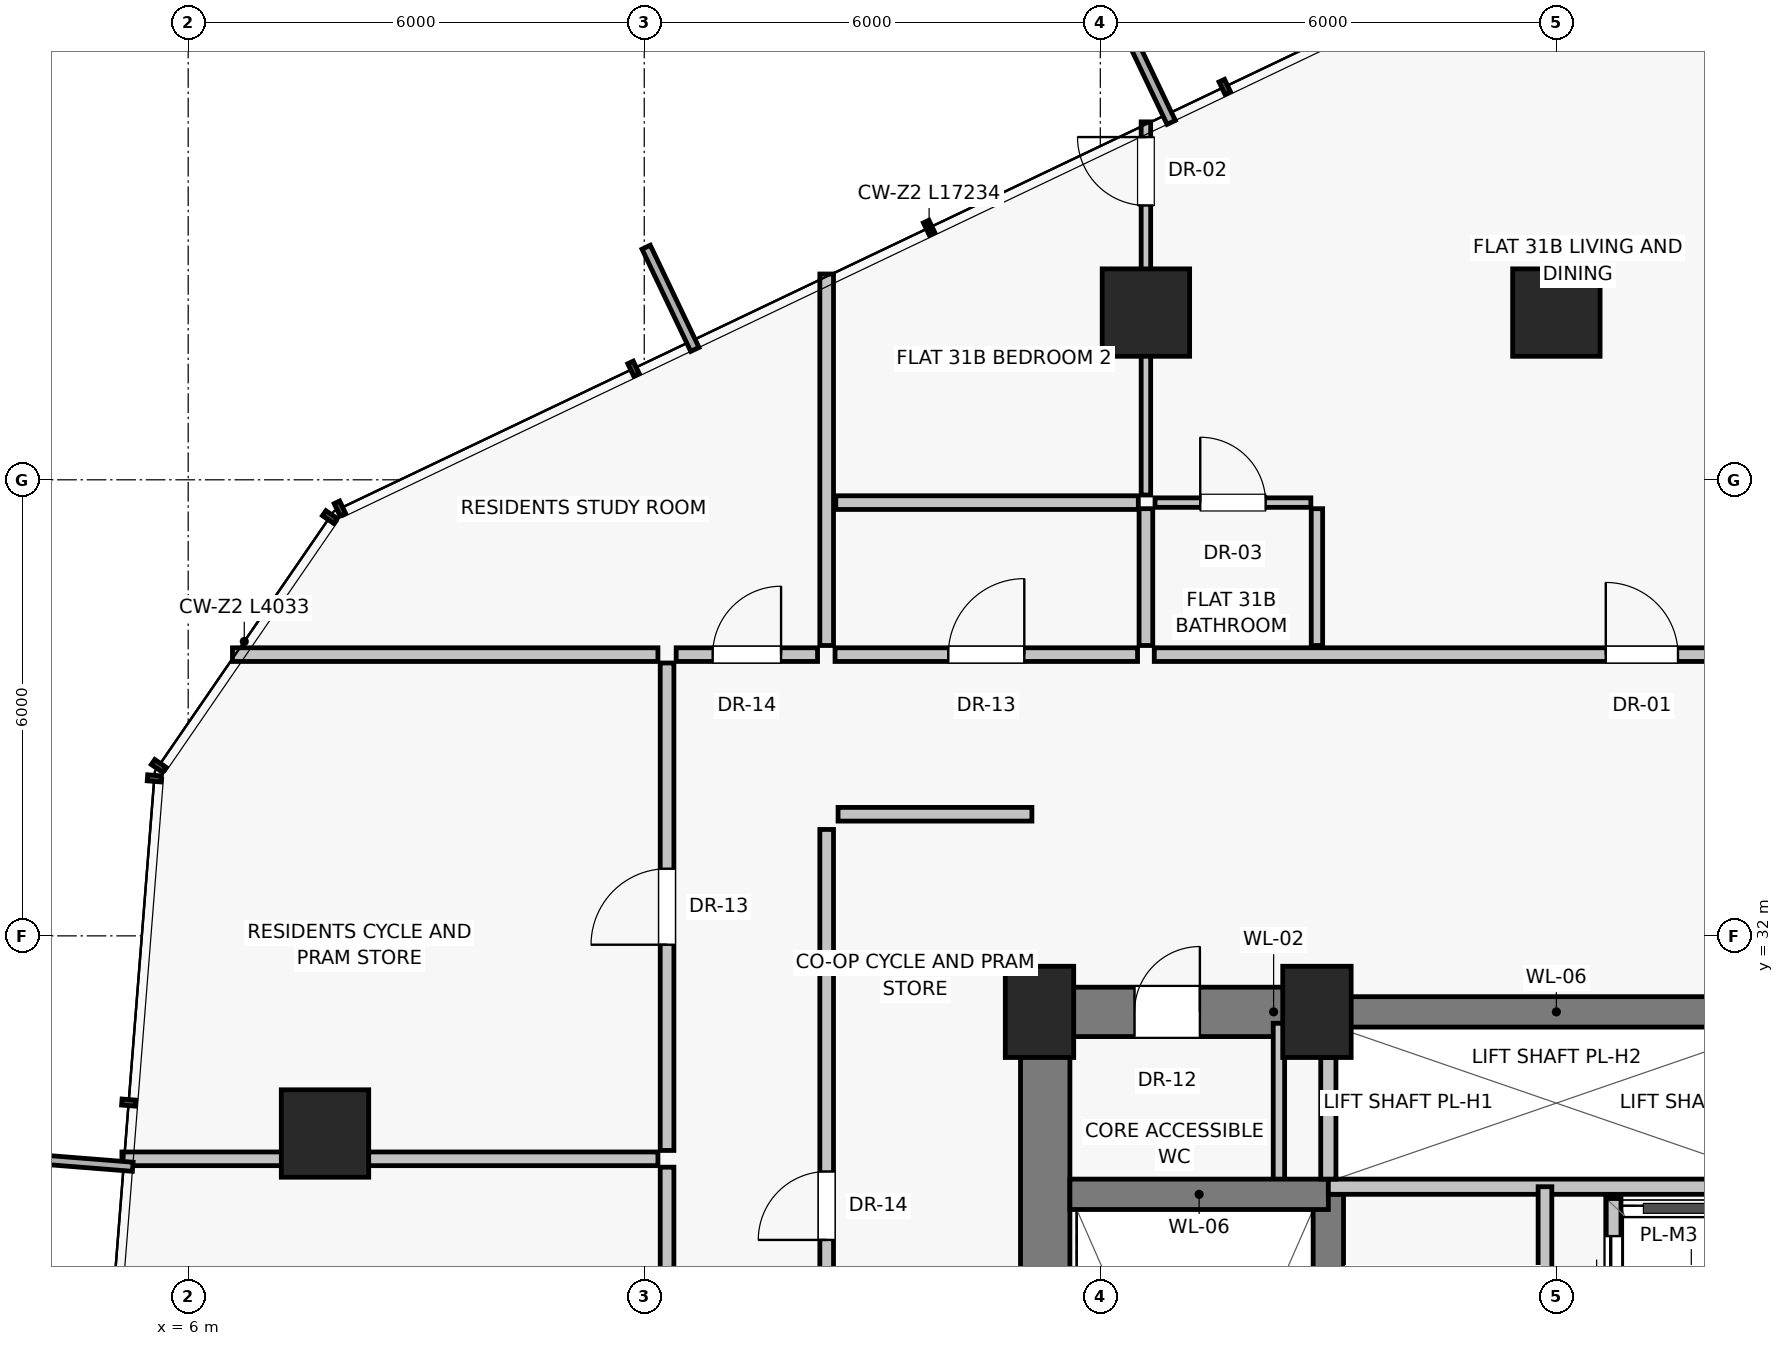
"""IFC4 building model, lengths in metres.
Left out: names, types, materials, properties, quantities, classifications, styles, units other than length and angle.
Written with IfcOpenShell. Run it as: python <this file> out.ifc"""

import sys

from ifc_helpers import new_model, si_unit, direction, frame, frame_2d, origin, origin_2d, place, context, subcontext, project, spatial, rectangle, extrude, source, transform, mapped, element, fill, save


model = new_model("IFC4")
c1 = context("Model", 3, precision=1e-05, world=origin(), true_north=direction((0.0, 1.0)))
c2 = subcontext(c1, "Body", "Model", "MODEL_VIEW")
j1 = project(units=[si_unit("LENGTHUNIT", "METRE"), si_unit("PLANEANGLEUNIT", "RADIAN")], contexts=[c1])
p1 = place(None, origin())
s1 = spatial("IfcSite", under=j1, at=p1, CompositionType="ELEMENT")
p2 = place(p1, origin())
s2 = spatial("IfcBuilding", under=s1, at=p2, CompositionType="ELEMENT")
p3 = place(p2, frame((0.0, 0.0, 113.25)))
s3 = spatial("IfcBuildingStorey", under=s2, at=p3, CompositionType="ELEMENT", Elevation=113.25)
for number, where, z_axis, x_axis in (
    (1, (17.2, 31.0, 0.0), (0.0, 0.0, 1.0), (1.0, 0.0, 0.0)),
    (2, (20.85, 31.0, 0.0), (0.0, 0.0, 1.0), (1.0, 0.0, 0.0)),
):
    element("IfcColumn", number, at=place(p3, frame(where, z_axis=z_axis, x_axis=x_axis)), inside=s3, PredefinedType="PILASTER", context=c2, shape_type="SweptSolid", body=[
        extrude(rectangle(XDim=0.9, YDim=1.2, at=origin_2d()), origin(), (0.0, 0.0, 1.0), 3.25),
    ])
for number, where, z_axis, x_axis in (
    (3, (24.0, 40.2, 0.0), (0.0, 0.0, 1.0), (1.0, 0.0, 0.0)),
    (4, (18.6, 40.2, 0.0), (0.0, 0.0, 1.0), (1.0, 0.0, 0.0)),
    (5, (7.8, 29.4, 0.0), (0.0, 0.0, 1.0), (1.0, 0.0, 0.0)),
):
    element("IfcColumn", number, at=place(p3, frame(where, z_axis=z_axis, x_axis=x_axis)), inside=s3, PredefinedType="COLUMN", context=c2, shape_type="SweptSolid", body=[
        extrude(rectangle(XDim=1.15, YDim=1.15, at=origin_2d()), origin(), (0.0, 0.0, 1.0), 3.25),
    ])
p4 = place(p3, frame((17.275, 16.8, 0.0), z_axis=(0.0, 0.0, 1.0), x_axis=(0.0, 1.0, 0.0)))
e6 = element("IfcWall", 6, at=p4, inside=s3, PredefinedType="SHEAR", context=c2, shape_type="SweptSolid", body=[
    extrude(rectangle(XDim=14.2, YDim=0.65, at=frame_2d((7.1, 0.0))), origin(), (0.0, 0.0, 1.0), 3.0),
])
p5 = place(p3, frame((17.2, 31.0, 0.0), z_axis=(0.0, 0.0, 1.0), x_axis=(1.0, 0.0, 0.0)))
e7 = element("IfcWall", 7, at=p5, inside=s3, PredefinedType="SHEAR", context=c2, shape_type="SweptSolid", body=[
    extrude(rectangle(XDim=3.8, YDim=0.65, at=frame_2d((1.9, 0.0))), origin(), (0.0, 0.0, 1.0), 3.0),
])
p6 = place(p5, frame((1.25, 0.0, 0.0)))
e8 = element("IfcOpeningElement", 8, at=p6, cuts=e7, PredefinedType="OPENING", context=c2, shape_type="SweptSolid", body=[
    extrude(rectangle(XDim=0.86, YDim=2.01, at=frame_2d((0.43, 1.005))), frame((0.0, 0.335, 0.0), z_axis=(0.0, -1.0, 0.0), x_axis=(1.0, 0.0, 0.0)), (0.0, 0.0, 1.0), 0.67),
])
p7 = place(p3, frame((21.0, 31.0, 0.0), z_axis=(0.0, 0.0, 1.0), x_axis=(1.0, 0.0, 0.0)))
e9 = element("IfcWall", 9, at=p7, inside=s3, PredefinedType="SHEAR", context=c2, shape_type="SweptSolid", body=[
    extrude(rectangle(XDim=6.0, YDim=0.4, at=frame_2d((3.0, 0.0))), origin(), (0.0, 0.0, 1.0), 3.0),
])
p8 = place(p3, frame((20.35, 28.65, 0.0), z_axis=(0.0, 0.0, 1.0), x_axis=(0.0, 1.0, 0.0)))
e10 = element("IfcWall", 10, at=p8, inside=s3, PredefinedType="PARTITIONING", context=c2, shape_type="SweptSolid", body=[
    extrude(rectangle(XDim=2.2, YDim=0.15, at=frame_2d((1.1, 0.0))), origin(), (0.0, 0.0, 1.0), 3.0),
])
p9 = place(p3, frame((21.0, 19.8, 0.0), z_axis=(0.0, 0.0, 1.0), x_axis=(0.0, 1.0, 0.0)))
e11 = element("IfcWall", 11, at=p9, inside=s3, PredefinedType="SHEAR", context=c2, shape_type="SweptSolid", body=[
    extrude(rectangle(XDim=8.8, YDim=0.4, at=frame_2d((4.4, 0.0))), origin(), (0.0, 0.0, 1.0), 3.0),
])
p10 = place(p3, frame((17.6, 28.6, 0.0), z_axis=(0.0, 0.0, 1.0), x_axis=(1.0, 0.0, 0.0)))
e12 = element("IfcWall", 12, at=p10, inside=s3, PredefinedType="SHEAR", context=c2, shape_type="SweptSolid", body=[
    extrude(rectangle(XDim=3.4, YDim=0.4, at=frame_2d((1.7, 0.0))), origin(), (0.0, 0.0, 1.0), 3.0),
])
p11 = place(p3, frame((21.0, 28.7, 0.0), z_axis=(0.0, 0.0, 1.0), x_axis=(1.0, 0.0, 0.0)))
e13 = element("IfcWall", 13, at=p11, inside=s3, PredefinedType="SOLIDWALL", context=c2, shape_type="SweptSolid", body=[
    extrude(rectangle(XDim=6.0, YDim=0.2, at=frame_2d((3.0, 0.0))), origin(), (0.0, 0.0, 1.0), 3.0),
])
p12 = place(p3, frame((21.0, 28.8, 0.0), z_axis=(0.0, 0.0, 1.0), x_axis=(0.0, 1.0, 0.0)))
e14 = element("IfcWall", 14, at=p12, inside=s3, PredefinedType="SOLIDWALL", context=c2, shape_type="SweptSolid", body=[
    extrude(rectangle(XDim=1.6, YDim=0.2, at=frame_2d((0.8, 0.0))), origin(), (0.0, 0.0, 1.0), 3.0),
])
p13 = place(p3, frame((23.85, 22.6, 0.0), z_axis=(0.0, 0.0, 1.0), x_axis=(0.0, 1.0, 0.0)))
e15 = element("IfcWall", 15, at=p13, inside=s3, PredefinedType="PARTITIONING", context=c2, shape_type="SweptSolid", body=[
    extrude(rectangle(XDim=6.1, YDim=0.18, at=frame_2d((3.05, 0.0))), origin(), (0.0, 0.0, 1.0), 3.0),
])
p14 = place(p13, frame((2.4, 0.0, 0.0)))
e16 = element("IfcOpeningElement", 16, at=p14, cuts=e15, PredefinedType="OPENING", context=c2, shape_type="SweptSolid", body=[
    extrude(rectangle(XDim=0.9, YDim=2.01, at=frame_2d((0.45, 1.005))), frame((0.0, 0.1, 0.0), z_axis=(0.0, -1.0, 0.0), x_axis=(1.0, 0.0, 0.0)), (0.0, 0.0, 1.0), 0.2),
])
p15 = place(p3, frame((24.75, 22.6, 0.0), z_axis=(0.0, 0.0, 1.0), x_axis=(0.0, 1.0, 0.0)))
e17 = element("IfcWall", 17, at=p15, inside=s3, PredefinedType="SOLIDWALL", context=c2, shape_type="SweptSolid", body=[
    extrude(rectangle(XDim=5.95, YDim=0.2, at=frame_2d((2.975, 0.0))), origin(), (0.0, 0.0, 1.0), 3.0),
])
p16 = place(p15, frame((0.45, 0.0, 0.0)))
e18 = element("IfcOpeningElement", 18, at=p16, cuts=e17, PredefinedType="OPENING", context=c2, shape_type="SweptSolid", body=[
    extrude(rectangle(XDim=1.1, YDim=2.08, at=frame_2d((0.55, 1.04))), frame((0.0, 0.11, 0.0), z_axis=(0.0, -1.0, 0.0), x_axis=(1.0, 0.0, 0.0)), (0.0, 0.0, 1.0), 0.22),
])
p17 = place(p15, frame((2.4, 0.0, 0.0)))
e19 = element("IfcOpeningElement", 19, at=p17, cuts=e17, PredefinedType="OPENING", context=c2, shape_type="SweptSolid", body=[
    extrude(rectangle(XDim=1.1, YDim=2.08, at=frame_2d((0.55, 1.04))), frame((0.0, 0.11, 0.0), z_axis=(0.0, -1.0, 0.0), x_axis=(1.0, 0.0, 0.0)), (0.0, 0.0, 1.0), 0.22),
])
p18 = place(p15, frame((4.35, 0.0, 0.0)))
e20 = element("IfcOpeningElement", 20, at=p18, cuts=e17, PredefinedType="OPENING", context=c2, shape_type="SweptSolid", body=[
    extrude(rectangle(XDim=1.1, YDim=2.08, at=frame_2d((0.55, 1.04))), frame((0.0, 0.11, 0.0), z_axis=(0.0, -1.0, 0.0), x_axis=(1.0, 0.0, 0.0)), (0.0, 0.0, 1.0), 0.22),
])
p19 = place(p3, frame((14.4, 24.2, 0.0), z_axis=(0.0, 0.0, 1.0), x_axis=(0.0, 1.0, 0.0)))
e21 = element("IfcWall", 21, at=p19, inside=s3, PredefinedType="PARTITIONING", context=c2, shape_type="SweptSolid", body=[
    extrude(rectangle(XDim=9.2, YDim=0.18, at=frame_2d((4.6, 0.0))), origin(), (0.0, 0.0, 1.0), 3.0),
])
p20 = place(p19, frame((3.8, 0.0, 0.0)))
e22 = element("IfcOpeningElement", 22, at=p20, cuts=e21, PredefinedType="OPENING", context=c2, shape_type="SweptSolid", body=[
    extrude(rectangle(XDim=0.9, YDim=2.01, at=frame_2d((0.45, 1.005))), frame((0.0, 0.1, 0.0), z_axis=(0.0, -1.0, 0.0), x_axis=(1.0, 0.0, 0.0)), (0.0, 0.0, 1.0), 0.2),
])
p21 = place(p3, frame((14.55, 33.6, 0.0), z_axis=(0.0, 0.0, 1.0), x_axis=(1.0, 0.0, 0.0)))
e23 = element("IfcWall", 23, at=p21, inside=s3, PredefinedType="PARTITIONING", context=c2, shape_type="SweptSolid", body=[
    extrude(rectangle(XDim=2.55, YDim=0.18, at=frame_2d((1.275, 0.0))), origin(), (0.0, 0.0, 1.0), 3.0),
])
p22 = place(p3, frame((14.4, 35.82, 0.0), z_axis=(0.0, 0.0, 1.0), x_axis=(0.0, 1.0, 0.0)))
e24 = element("IfcWall", 24, at=p22, inside=s3, PredefinedType="PARTITIONING", context=c2, shape_type="SweptSolid", body=[
    extrude(rectangle(XDim=4.887, YDim=0.18, at=frame_2d((2.444, 0.0))), origin(), (0.0, 0.0, 1.0), 3.0),
])
p23 = place(p3, frame((14.51, 35.7, 0.0), z_axis=(0.0, 0.0, 1.0), x_axis=(1.0, 0.0, 0.0)))
e25 = element("IfcWall", 25, at=p23, inside=s3, PredefinedType="PARTITIONING", context=c2, shape_type="SweptSolid", body=[
    extrude(rectangle(XDim=3.98, YDim=0.18, at=frame_2d((1.99, 0.0))), origin(), (0.0, 0.0, 1.0), 2.58),
])
p24 = place(p23, frame((1.49, 0.0, 0.0)))
e26 = element("IfcOpeningElement", 26, at=p24, cuts=e25, PredefinedType="OPENING", context=c2, shape_type="SweptSolid", body=[
    extrude(rectangle(XDim=1.0, YDim=2.01, at=frame_2d((0.5, 1.005))), frame((0.0, 0.1, 0.0), z_axis=(0.0, -1.0, 0.0), x_axis=(1.0, 0.0, 0.0)), (0.0, 0.0, 1.0), 0.2),
])
p25 = place(p3, frame((18.71, 35.7, 0.0), z_axis=(0.0, 0.0, 1.0), x_axis=(1.0, 0.0, 0.0)))
e27 = element("IfcWall", 27, at=p25, inside=s3, PredefinedType="PARTITIONING", context=c2, shape_type="SweptSolid", body=[
    extrude(rectangle(XDim=14.78, YDim=0.18, at=frame_2d((7.39, 0.0))), origin(), (0.0, 0.0, 1.0), 2.58),
])
p26 = place(p25, frame((5.94, 0.0, 0.0)))
e28 = element("IfcOpeningElement", 28, at=p26, cuts=e27, PredefinedType="OPENING", context=c2, shape_type="SweptSolid", body=[
    extrude(rectangle(XDim=0.95, YDim=2.02, at=frame_2d((0.475, 1.01))), frame((0.0, 0.1, 0.0), z_axis=(0.0, -1.0, 0.0), x_axis=(1.0, 0.0, 0.0)), (0.0, 0.0, 1.0), 0.2),
])
p27 = place(p3, frame((14.52, 37.7, 0.0), z_axis=(0.0, 0.0, 1.0), x_axis=(1.0, 0.0, 0.0)))
e29 = element("IfcWall", 29, at=p27, inside=s3, PredefinedType="PARTITIONING", context=c2, shape_type="SweptSolid", body=[
    extrude(rectangle(XDim=3.98, YDim=0.18, at=frame_2d((1.99, 0.0))), origin(), (0.0, 0.0, 1.0), 3.0),
])
p28 = place(p3, frame((18.6, 35.82, 0.0), z_axis=(0.0, 0.0, 1.0), x_axis=(0.0, 1.0, 0.0)))
e30 = element("IfcWall", 30, at=p28, inside=s3, PredefinedType="PARTITIONING", context=c2, shape_type="SweptSolid", body=[
    extrude(rectangle(XDim=1.8, YDim=0.18, at=frame_2d((0.9, 0.0))), origin(), (0.0, 0.0, 1.0), 2.378),
])
p29 = place(p3, frame((18.6, 37.8, 0.0), z_axis=(0.0, 0.0, 1.0), x_axis=(0.0, 1.0, 0.0)))
e31 = element("IfcWall", 31, at=p29, inside=s3, PredefinedType="PARTITIONING", context=c2, shape_type="SweptSolid", body=[
    extrude(rectangle(XDim=4.909, YDim=0.125, at=frame_2d((2.455, 0.0))), origin(), (0.0, 0.0, 1.0), 2.378),
])
p30 = place(p29, frame((3.809, 0.0, 0.0)))
e32 = element("IfcOpeningElement", 32, at=p30, cuts=e31, PredefinedType="OPENING", context=c2, shape_type="SweptSolid", body=[
    extrude(rectangle(XDim=0.9, YDim=2.01, at=frame_2d((0.45, 1.005))), frame((0.0, 0.073, 0.0), z_axis=(0.0, -1.0, 0.0), x_axis=(1.0, 0.0, 0.0)), (0.0, 0.0, 1.0), 0.145),
])
p31 = place(p3, frame((20.85, 35.82, 0.0), z_axis=(0.0, 0.0, 1.0), x_axis=(0.0, 1.0, 0.0)))
e33 = element("IfcWall", 33, at=p31, inside=s3, PredefinedType="PARTITIONING", context=c2, shape_type="SweptSolid", body=[
    extrude(rectangle(XDim=1.8, YDim=0.15, at=frame_2d((0.9, 0.0))), origin(), (0.0, 0.0, 1.0), 3.0),
])
p32 = place(p3, frame((18.72, 37.7, 0.0), z_axis=(0.0, 0.0, 1.0), x_axis=(1.0, 0.0, 0.0)))
e34 = element("IfcWall", 34, at=p32, inside=s3, PredefinedType="PARTITIONING", context=c2, shape_type="SweptSolid", body=[
    extrude(rectangle(XDim=2.05, YDim=0.125, at=frame_2d((1.025, 0.0))), origin(), (0.0, 0.0, 1.0), 3.0),
])
p33 = place(p32, frame((0.595, 0.0, 0.0)))
e35 = element("IfcOpeningElement", 35, at=p33, cuts=e34, PredefinedType="OPENING", context=c2, shape_type="SweptSolid", body=[
    extrude(rectangle(XDim=0.86, YDim=2.01, at=frame_2d((0.43, 1.005))), frame((0.0, 0.073, 0.0), z_axis=(0.0, -1.0, 0.0), x_axis=(1.0, 0.0, 0.0)), (0.0, 0.0, 1.0), 0.145),
])
p34 = place(p3, frame((12.18, 35.7, 0.0), z_axis=(0.0, 0.0, 1.0), x_axis=(-1.0, 0.0, 0.0)))
e36 = element("IfcWall", 36, at=p34, inside=s3, PredefinedType="PARTITIONING", context=c2, shape_type="SweptSolid", body=[
    extrude(rectangle(XDim=5.597, YDim=0.18, at=frame_2d((2.799, 0.0))), origin(), (0.0, 0.0, 1.0), 3.0),
])
p35 = place(p3, frame((12.3, 25.112, 0.0), z_axis=(0.0, 0.0, 1.0), x_axis=(0.0, 1.0, 0.0)))
e37 = element("IfcWall", 37, at=p35, inside=s3, PredefinedType="PARTITIONING", context=c2, shape_type="SweptSolid", body=[
    extrude(rectangle(XDim=3.845, YDim=0.18, at=frame_2d((1.922, 0.0))), origin(), (0.0, 0.0, 1.0), 2.58),
])
p36 = place(p35, frame((1.423, 0.0, 0.0)))
e38 = element("IfcOpeningElement", 38, at=p36, cuts=e37, PredefinedType="OPENING", context=c2, shape_type="SweptSolid", body=[
    extrude(rectangle(XDim=1.0, YDim=2.01, at=frame_2d((0.5, 1.005))), frame((0.0, 0.1, 0.0), z_axis=(0.0, -1.0, 0.0), x_axis=(1.0, 0.0, 0.0)), (0.0, 0.0, 1.0), 0.2),
])
p37 = place(p3, frame((12.3, 29.177, 0.0), z_axis=(0.0, 0.0, 1.0), x_axis=(0.0, 1.0, 0.0)))
e39 = element("IfcWall", 39, at=p37, inside=s3, PredefinedType="PARTITIONING", context=c2, shape_type="SweptSolid", body=[
    extrude(rectangle(XDim=6.413, YDim=0.18, at=frame_2d((3.207, 0.0))), origin(), (0.0, 0.0, 1.0), 2.58),
])
p38 = place(p37, frame((2.707, 0.0, 0.0)))
e40 = element("IfcOpeningElement", 40, at=p38, cuts=e39, PredefinedType="OPENING", context=c2, shape_type="SweptSolid", body=[
    extrude(rectangle(XDim=1.0, YDim=2.01, at=frame_2d((0.5, 1.005))), frame((0.0, 0.1, 0.0), z_axis=(0.0, -1.0, 0.0), x_axis=(1.0, 0.0, 0.0)), (0.0, 0.0, 1.0), 0.2),
])
p39 = place(p3, frame((12.18, 29.067, 0.0), z_axis=(0.0, 0.0, 1.0), x_axis=(-1.0, 0.0, 0.0)))
e41 = element("IfcWall", 41, at=p39, inside=s3, PredefinedType="PARTITIONING", context=c2, shape_type="SweptSolid", body=[
    extrude(rectangle(XDim=7.052, YDim=0.18, at=frame_2d((3.526, 0.0))), origin(), (0.0, 0.0, 1.0), 2.378),
])
p40 = place(p3, frame((12.42, 35.7, 0.0), z_axis=(0.0, 0.0, 1.0), x_axis=(1.0, 0.0, 0.0)))
e42 = element("IfcWall", 42, at=p40, inside=s3, PredefinedType="PARTITIONING", context=c2, shape_type="SweptSolid", body=[
    extrude(rectangle(XDim=1.86, YDim=0.18, at=frame_2d((0.93, 0.0))), origin(), (0.0, 0.0, 1.0), 3.0),
])
p41 = place(p40, frame((0.48, 0.0, 0.0)))
e43 = element("IfcOpeningElement", 43, at=p41, cuts=e42, PredefinedType="OPENING", context=c2, shape_type="SweptSolid", body=[
    extrude(rectangle(XDim=0.9, YDim=2.01, at=frame_2d((0.45, 1.005))), frame((0.0, 0.1, 0.0), z_axis=(0.0, -1.0, 0.0), x_axis=(1.0, 0.0, 0.0)), (0.0, 0.0, 1.0), 0.2),
])
m1 = source(origin(), c2, "Body", "SweptSolid", [
    extrude(rectangle(XDim=0.86, YDim=2.01, at=frame_2d((0.43, 1.005))), frame((0.0, 0.025, 0.0), z_axis=(0.0, -1.0, 0.0), x_axis=(1.0, 0.0, 0.0)), (0.0, 0.0, 1.0), 0.05),
])
p42 = place(p6, origin())
e44 = element("IfcDoor", 44, at=p42, inside=s3, OperationType="SINGLE_SWING_RIGHT", PredefinedType="DOOR", context=c2, shape_type="MappedRepresentation", body=[
    mapped(m1, transform((0.0, 0.0, 0.0), scale=1.0)),
])
fill(e8, e44)
m2 = source(origin(), c2, "Body", "SweptSolid", [
    extrude(rectangle(XDim=1.1, YDim=2.08, at=frame_2d((0.55, 1.04))), frame((0.0, 0.025, 0.0), z_axis=(0.0, -1.0, 0.0), x_axis=(1.0, 0.0, 0.0)), (0.0, 0.0, 1.0), 0.05),
])
p43 = place(p18, origin())
e45 = element("IfcDoor", 45, at=p43, inside=s3, OperationType="SLIDING_TO_LEFT", PredefinedType="DOOR", context=c2, shape_type="MappedRepresentation", body=[
    mapped(m2, transform((0.0, 0.0, 0.0), scale=1.0)),
])
fill(e20, e45)
m3 = source(origin(), c2, "Body", "SweptSolid", [
    extrude(rectangle(XDim=0.9, YDim=2.01, at=frame_2d((0.45, 1.005))), frame((0.0, 0.025, 0.0), z_axis=(0.0, -1.0, 0.0), x_axis=(1.0, 0.0, 0.0)), (0.0, 0.0, 1.0), 0.05),
])
p44 = place(p20, origin())
e46 = element("IfcDoor", 46, at=p44, inside=s3, OperationType="SINGLE_SWING_LEFT", PredefinedType="DOOR", context=c2, shape_type="MappedRepresentation", body=[
    mapped(m3, transform((0.0, 0.0, 0.0), scale=1.0)),
])
fill(e22, e46)
m4 = source(origin(), c2, "Body", "SweptSolid", [
    extrude(rectangle(XDim=1.0, YDim=2.01, at=frame_2d((0.5, 1.005))), frame((0.0, 0.025, 0.0), z_axis=(0.0, -1.0, 0.0), x_axis=(1.0, 0.0, 0.0)), (0.0, 0.0, 1.0), 0.05),
])
p45 = place(p24, origin())
e47 = element("IfcDoor", 47, at=p45, inside=s3, OperationType="SINGLE_SWING_RIGHT", PredefinedType="DOOR", context=c2, shape_type="MappedRepresentation", body=[
    mapped(m4, transform((0.0, 0.0, 0.0), scale=1.0)),
])
fill(e26, e47)
m5 = source(origin(), c2, "Body", "SweptSolid", [
    extrude(rectangle(XDim=0.95, YDim=2.02, at=frame_2d((0.475, 1.01))), frame((0.0, 0.025, 0.0), z_axis=(0.0, -1.0, 0.0), x_axis=(1.0, 0.0, 0.0)), (0.0, 0.0, 1.0), 0.05),
])
p46 = place(p26, origin())
e48 = element("IfcDoor", 48, at=p46, inside=s3, OperationType="SINGLE_SWING_LEFT", PredefinedType="DOOR", context=c2, shape_type="MappedRepresentation", body=[
    mapped(m5, transform((0.0, 0.0, 0.0), scale=1.0)),
])
fill(e28, e48)
p47 = place(p30, origin())
e49 = element("IfcDoor", 49, at=p47, inside=s3, OperationType="SINGLE_SWING_RIGHT", PredefinedType="DOOR", context=c2, shape_type="MappedRepresentation", body=[
    mapped(m3, transform((0.0, 0.0, 0.0), scale=1.0)),
])
fill(e32, e49)
p48 = place(p33, origin())
e50 = element("IfcDoor", 50, at=p48, inside=s3, OperationType="SINGLE_SWING_LEFT", PredefinedType="DOOR", context=c2, shape_type="MappedRepresentation", body=[
    mapped(m1, transform((0.0, 0.0, 0.0), scale=1.0)),
])
fill(e35, e50)
p49 = place(p38, origin())
e51 = element("IfcDoor", 51, at=p49, inside=s3, OperationType="SINGLE_SWING_LEFT", PredefinedType="DOOR", context=c2, shape_type="MappedRepresentation", body=[
    mapped(m4, transform((0.0, 0.0, 0.0), scale=1.0)),
])
fill(e40, e51)
p50 = place(p41, origin())
e52 = element("IfcDoor", 52, at=p50, inside=s3, OperationType="SINGLE_SWING_RIGHT", PredefinedType="DOOR", context=c2, shape_type="MappedRepresentation", body=[
    mapped(m3, transform((0.0, 0.0, 0.0), scale=1.0)),
])
fill(e43, e52)
save(model, sys.argv[1])
